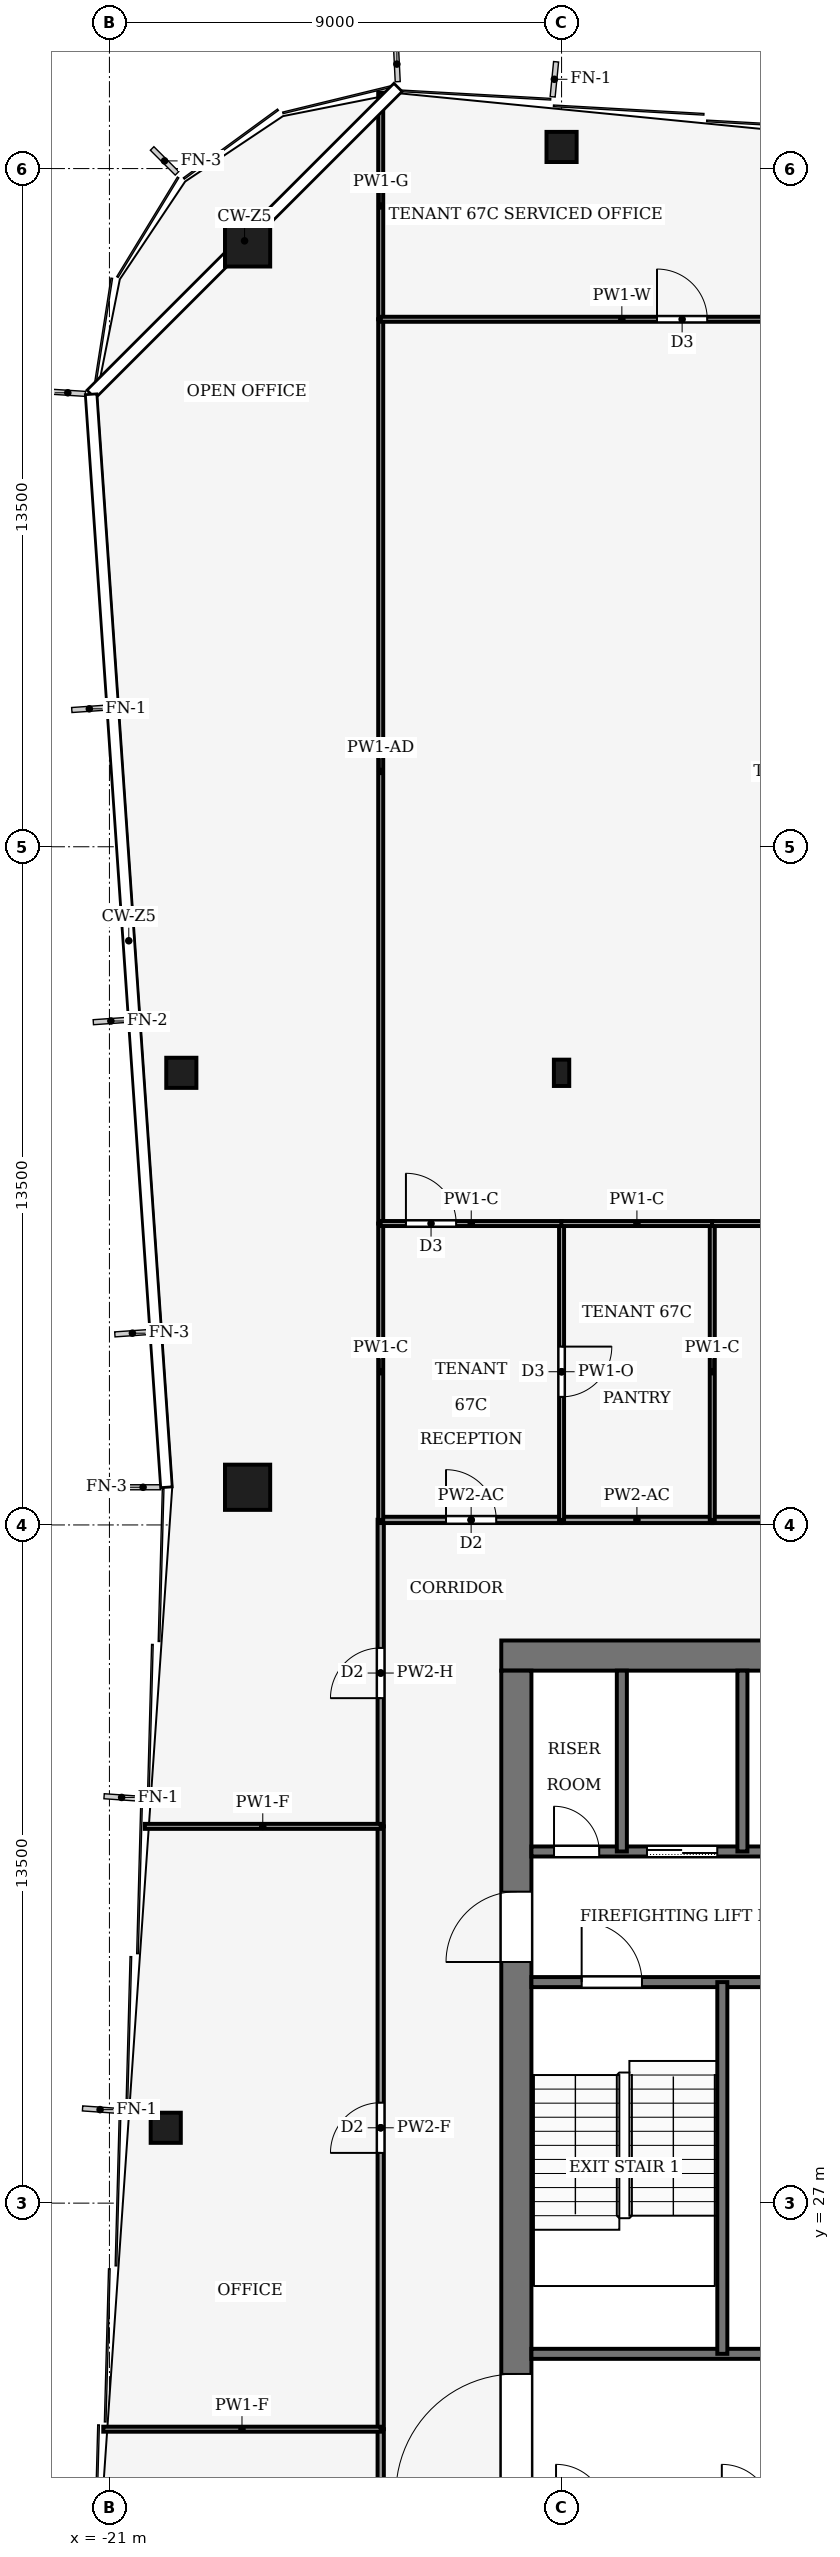
"""IFC4 building model, lengths in metres.
Left out: names, types, materials, properties, quantities, classifications, styles, units other than length and angle.
Written with IfcOpenShell. Run it as: python <this file> out.ifc"""

import sys

from ifc_helpers import new_model, si_unit, direction, frame, frame_2d, origin, origin_2d, place, context, subcontext, project, spatial, rectangle, hollow_rectangle, i_section, extrude, element, fill, save


model = new_model("IFC4")
c1 = context("Model", 3, precision=1e-05, world=origin(), true_north=direction((0.0, 1.0)))
c2 = subcontext(c1, "Body", "Model", "MODEL_VIEW")
j1 = project(units=[si_unit("LENGTHUNIT", "METRE"), si_unit("PLANEANGLEUNIT", "RADIAN")], contexts=[c1])
p1 = place(None, origin())
s1 = spatial("IfcSite", under=j1, at=p1, CompositionType="ELEMENT")
p2 = place(p1, origin())
s2 = spatial("IfcBuilding", under=s1, at=p2, CompositionType="ELEMENT")
p3 = place(p2, frame((0.0, 0.0, 294.0)))
s3 = spatial("IfcBuildingStorey", under=s2, at=p3, CompositionType="ELEMENT", Elevation=294.0)
p4 = place(p3, frame((-13.2, 37.9, -0.13), z_axis=(0.0, 0.0, 1.0), x_axis=(1.0, 0.0, 0.0)))
e1 = element("IfcWall", 1, at=p4, inside=s3, PredefinedType="SHEAR", context=c2, shape_type="SweptSolid", body=[
    extrude(rectangle(XDim=26.4, YDim=0.6, at=frame_2d((13.2, 0.0))), origin(), (0.0, 0.0, 1.0), 4.0),
])
p5 = place(p3, frame((-12.9, 18.4, -0.13), z_axis=(0.0, 0.0, 1.0), x_axis=(0.0, 1.0, 0.0)))
e2 = element("IfcWall", 2, at=p5, inside=s3, PredefinedType="SHEAR", context=c2, shape_type="SweptSolid", body=[
    extrude(rectangle(XDim=19.2, YDim=0.6, at=frame_2d((9.6, 0.0))), origin(), (0.0, 0.0, 1.0), 4.0),
])
p6 = place(p5, frame((2.8, 0.0, 0.13)))
e3 = element("IfcOpeningElement", 3, at=p6, cuts=e2, PredefinedType="OPENING", context=c2, shape_type="SweptSolid", body=[
    extrude(rectangle(XDim=2.4, YDim=2.4, at=frame_2d((1.2, 1.2))), frame((0.0, 0.31, 0.0), z_axis=(0.0, -1.0, 0.0), x_axis=(1.0, 0.0, 0.0)), (0.0, 0.0, 1.0), 0.62),
])
p7 = place(p5, frame((13.4, 0.0, 0.13)))
e4 = element("IfcOpeningElement", 4, at=p7, cuts=e2, PredefinedType="OPENING", context=c2, shape_type="SweptSolid", body=[
    extrude(rectangle(XDim=1.4, YDim=2.2, at=frame_2d((0.7, 1.1))), frame((0.0, 0.31, 0.0), z_axis=(0.0, -1.0, 0.0), x_axis=(1.0, 0.0, 0.0)), (0.0, 0.0, 1.0), 0.62),
])
for number, where, z_axis, x_axis in (
    (5, (-18.25, 66.0, 0.0), (0.0, 0.0, 1.0), (1.0, 0.0, 0.0)),
    (6, (-18.25, 41.25, 0.0), (0.0, 0.0, 1.0), (1.0, 0.0, 0.0)),
):
    element("IfcColumn", number, at=place(p3, frame(where, z_axis=z_axis, x_axis=x_axis)), inside=s3, PredefinedType="COLUMN", context=c2, shape_type="SweptSolid", body=[
        extrude(hollow_rectangle(XDim=0.9, YDim=0.9, WallThickness=0.04, at=origin_2d()), origin(), (0.0, 0.0, 1.0), 4.0),
    ])
for number, where, z_axis, x_axis in (
    (7, (-12.0, 67.93, 0.0), (0.0, 0.0, 1.0), (1.0, 0.0, 0.0)),
    (8, (-19.879, 28.5, 0.0), (0.0, 0.0, 1.0), (1.0, 0.0, 0.0)),
    (9, (-19.569, 49.5, 0.0), (0.0, 0.0, 1.0), (1.0, 0.0, 0.0)),
):
    element("IfcColumn", number, at=place(p3, frame(where, z_axis=z_axis, x_axis=x_axis)), inside=s3, PredefinedType="COLUMN", context=c2, shape_type="SweptSolid", body=[
        extrude(hollow_rectangle(XDim=0.6, YDim=0.6, WallThickness=0.025, at=origin_2d()), origin(), (0.0, 0.0, 1.0), 4.0),
    ])
p8 = place(p3, frame((-12.0, 49.5, 0.0), z_axis=(0.0, 0.0, 1.0), x_axis=(1.0, 0.0, 0.0)))
e10 = element("IfcColumn", 10, at=p8, inside=s3, PredefinedType="COLUMN", context=c2, shape_type="SweptSolid", body=[
    extrude(i_section(OverallWidth=0.306, OverallDepth=0.524, WebThickness=0.012, FlangeThickness=0.04, FilletRadius=0.027, at=origin_2d()), origin(), (0.0, 0.0, 1.0), 4.0),
])
p9 = place(p3, frame((-12.6, 24.0, 0.0), z_axis=(0.0, 0.0, 1.0), x_axis=(1.0, 0.0, 0.0)))
e11 = element("IfcWall", 11, at=p9, inside=s3, PredefinedType="PARTITIONING", context=c2, shape_type="SweptSolid", body=[
    extrude(rectangle(XDim=6.6, YDim=0.2, at=frame_2d((3.3, 0.0))), origin(), (0.0, 0.0, 1.0), 3.87),
])
p10 = place(p9, frame((4.7, 0.0, 0.0)))
e12 = element("IfcOpeningElement", 12, at=p10, cuts=e11, PredefinedType="OPENING", context=c2, shape_type="SweptSolid", body=[
    extrude(rectangle(XDim=1.0, YDim=2.1, at=frame_2d((0.5, 1.05))), frame((0.0, 0.11, 0.0), z_axis=(0.0, -1.0, 0.0), x_axis=(1.0, 0.0, 0.0)), (0.0, 0.0, 1.0), 0.22),
])
p11 = place(p3, frame((-12.6, 31.4, 0.0), z_axis=(0.0, 0.0, 1.0), x_axis=(1.0, 0.0, 0.0)))
e13 = element("IfcWall", 13, at=p11, inside=s3, PredefinedType="PARTITIONING", context=c2, shape_type="SweptSolid", body=[
    extrude(rectangle(XDim=6.6, YDim=0.2, at=frame_2d((3.3, 0.0))), origin(), (0.0, 0.0, 1.0), 3.87),
])
p12 = place(p11, frame((1.0, 0.0, 0.0)))
e14 = element("IfcOpeningElement", 14, at=p12, cuts=e13, PredefinedType="OPENING", context=c2, shape_type="SweptSolid", body=[
    extrude(rectangle(XDim=1.2, YDim=2.2, at=frame_2d((0.6, 1.1))), frame((0.0, 0.11, 0.0), z_axis=(0.0, -1.0, 0.0), x_axis=(1.0, 0.0, 0.0)), (0.0, 0.0, 1.0), 0.22),
])
p13 = place(p3, frame((-12.6, 34.0, 0.0), z_axis=(0.0, 0.0, 1.0), x_axis=(1.0, 0.0, 0.0)))
e15 = element("IfcWall", 15, at=p13, inside=s3, PredefinedType="PARTITIONING", context=c2, shape_type="SweptSolid", body=[
    extrude(rectangle(XDim=6.6, YDim=0.2, at=frame_2d((3.3, 0.0))), origin(), (0.0, 0.0, 1.0), 3.87),
])
p14 = place(p13, frame((4.7, 0.0, 0.0)))
e16 = element("IfcOpeningElement", 16, at=p14, cuts=e15, PredefinedType="OPENING", context=c2, shape_type="SweptSolid", body=[
    extrude(rectangle(XDim=1.4, YDim=2.2, at=frame_2d((0.7, 1.1))), frame((0.0, 0.11, 0.0), z_axis=(0.0, -1.0, 0.0), x_axis=(1.0, 0.0, 0.0)), (0.0, 0.0, 1.0), 0.22),
])
p15 = place(p13, frame((2.3, 0.0, 0.0)))
e17 = element("IfcOpeningElement", 17, at=p15, cuts=e15, PredefinedType="OPENING", context=c2, shape_type="SweptSolid", body=[
    extrude(rectangle(XDim=1.4, YDim=2.2, at=frame_2d((0.7, 1.1))), frame((0.0, 0.11, 0.0), z_axis=(0.0, -1.0, 0.0), x_axis=(1.0, 0.0, 0.0)), (0.0, 0.0, 1.0), 0.22),
])
p16 = place(p13, frame((0.45, 0.0, 0.0)))
e18 = element("IfcOpeningElement", 18, at=p16, cuts=e15, PredefinedType="OPENING", context=c2, shape_type="SweptSolid", body=[
    extrude(rectangle(XDim=0.9, YDim=2.1, at=frame_2d((0.45, 1.05))), frame((0.0, 0.11, 0.0), z_axis=(0.0, -1.0, 0.0), x_axis=(1.0, 0.0, 0.0)), (0.0, 0.0, 1.0), 0.22),
])
p17 = place(p3, frame((-10.8, 34.0, 0.0), z_axis=(0.0, 0.0, 1.0), x_axis=(0.0, 1.0, 0.0)))
e19 = element("IfcWall", 19, at=p17, inside=s3, PredefinedType="PARTITIONING", context=c2, shape_type="SweptSolid", body=[
    extrude(rectangle(XDim=3.6, YDim=0.2, at=frame_2d((1.8, 0.0))), origin(), (0.0, 0.0, 1.0), 3.87),
])
p18 = place(p3, frame((-8.8, 24.0, 0.0), z_axis=(0.0, 0.0, 1.0), x_axis=(0.0, 1.0, 0.0)))
e20 = element("IfcWall", 20, at=p18, inside=s3, PredefinedType="PARTITIONING", context=c2, shape_type="SweptSolid", body=[
    extrude(rectangle(XDim=7.4, YDim=0.2, at=frame_2d((3.7, 0.0))), origin(), (0.0, 0.0, 1.0), 3.87),
])
p19 = place(p3, frame((-8.4, 34.0, 0.0), z_axis=(0.0, 0.0, 1.0), x_axis=(0.0, 1.0, 0.0)))
e21 = element("IfcWall", 21, at=p19, inside=s3, PredefinedType="PARTITIONING", context=c2, shape_type="SweptSolid", body=[
    extrude(rectangle(XDim=3.6, YDim=0.2, at=frame_2d((1.8, 0.0))), origin(), (0.0, 0.0, 1.0), 3.87),
])
p20 = place(p3, frame((-15.6, 13.49, 0.0), z_axis=(0.0, 0.0, 1.0), x_axis=(0.0, 1.0, 0.0)))
e22 = element("IfcWall", 22, at=p20, inside=s3, PredefinedType="PARTITIONING", context=c2, shape_type="SweptSolid", body=[
    extrude(rectangle(XDim=9.01, YDim=0.125, at=frame_2d((4.505, 0.0))), origin(), (0.0, 0.0, 1.0), 2.93),
])
p21 = place(p20, frame((5.271, 0.0, 0.0)))
e23 = element("IfcOpeningElement", 23, at=p21, cuts=e22, PredefinedType="OPENING", context=c2, shape_type="SweptSolid", body=[
    extrude(rectangle(XDim=1.0, YDim=2.1, at=frame_2d((0.5, 1.05))), frame((0.0, 0.073, 0.0), z_axis=(0.0, -1.0, 0.0), x_axis=(1.0, 0.0, 0.0)), (0.0, 0.0, 1.0), 0.145),
])
p22 = place(p3, frame((-15.6, 22.5, 0.0), z_axis=(0.0, 0.0, 1.0), x_axis=(0.0, 1.0, 0.0)))
e24 = element("IfcWall", 24, at=p22, inside=s3, PredefinedType="PARTITIONING", context=c2, shape_type="SweptSolid", body=[
    extrude(rectangle(XDim=12.0, YDim=0.125, at=frame_2d((6.0, 0.0))), origin(), (0.0, 0.0, 1.0), 3.54),
])
p23 = place(p22, frame((5.5, 0.0, 0.0)))
e25 = element("IfcOpeningElement", 25, at=p23, cuts=e24, PredefinedType="OPENING", context=c2, shape_type="SweptSolid", body=[
    extrude(rectangle(XDim=1.0, YDim=2.1, at=frame_2d((0.5, 1.05))), frame((0.0, 0.073, 0.0), z_axis=(0.0, -1.0, 0.0), x_axis=(1.0, 0.0, 0.0)), (0.0, 0.0, 1.0), 0.145),
])
p24 = place(p3, frame((-15.6, 34.5, 0.0), z_axis=(0.0, 0.0, 1.0), x_axis=(0.0, 1.0, 0.0)))
e26 = element("IfcWall", 26, at=p24, inside=s3, PredefinedType="PARTITIONING", context=c2, shape_type="SweptSolid", body=[
    extrude(rectangle(XDim=6.104, YDim=0.125, at=frame_2d((3.052, 0.0))), origin(), (0.0, 0.0, 1.0), 3.14),
])
p25 = place(p24, frame((2.552, 0.0, 0.0)))
e27 = element("IfcOpeningElement", 27, at=p25, cuts=e26, PredefinedType="OPENING", context=c2, shape_type="SweptSolid", body=[
    extrude(rectangle(XDim=1.0, YDim=2.1, at=frame_2d((0.5, 1.05))), frame((0.0, 0.073, 0.0), z_axis=(0.0, -1.0, 0.0), x_axis=(1.0, 0.0, 0.0)), (0.0, 0.0, 1.0), 0.145),
])
p26 = place(p3, frame((-15.6, 40.6, 0.0), z_axis=(0.0, 0.0, 1.0), x_axis=(1.0, 0.0, 0.0)))
e28 = element("IfcWall", 28, at=p26, inside=s3, PredefinedType="PARTITIONING", context=c2, shape_type="SweptSolid", body=[
    extrude(rectangle(XDim=3.6, YDim=0.125, at=frame_2d((1.8, 0.0))), origin(), (0.0, 0.0, 1.0), 3.39),
])
p27 = place(p26, frame((1.3, 0.0, 0.0)))
e29 = element("IfcOpeningElement", 29, at=p27, cuts=e28, PredefinedType="OPENING", context=c2, shape_type="SweptSolid", body=[
    extrude(rectangle(XDim=1.0, YDim=2.1, at=frame_2d((0.5, 1.05))), frame((0.0, 0.073, 0.0), z_axis=(0.0, -1.0, 0.0), x_axis=(1.0, 0.0, 0.0)), (0.0, 0.0, 1.0), 0.145),
])
p28 = place(p3, frame((-9.0, 40.6, 0.0), z_axis=(0.0, 0.0, 1.0), x_axis=(-1.0, 0.0, 0.0)))
e30 = element("IfcWall", 30, at=p28, inside=s3, PredefinedType="PARTITIONING", context=c2, shape_type="SweptSolid", body=[
    extrude(rectangle(XDim=3.0, YDim=0.125, at=frame_2d((1.5, 0.0))), origin(), (0.0, 0.0, 1.0), 3.39),
])
p29 = place(p3, frame((-9.0, 40.6, 0.0), z_axis=(0.0, 0.0, 1.0), x_axis=(1.0, 0.0, 0.0)))
e31 = element("IfcWall", 31, at=p29, inside=s3, PredefinedType="PARTITIONING", context=c2, shape_type="SweptSolid", body=[
    extrude(rectangle(XDim=12.0, YDim=0.125, at=frame_2d((6.0, 0.0))), origin(), (0.0, 0.0, 1.0), 3.39),
])
p30 = place(p29, frame((5.5, 0.0, 0.0)))
e32 = element("IfcOpeningElement", 32, at=p30, cuts=e31, PredefinedType="OPENING", context=c2, shape_type="SweptSolid", body=[
    extrude(rectangle(XDim=1.0, YDim=2.1, at=frame_2d((0.5, 1.05))), frame((0.0, 0.073, 0.0), z_axis=(0.0, -1.0, 0.0), x_axis=(1.0, 0.0, 0.0)), (0.0, 0.0, 1.0), 0.145),
])
p31 = place(p3, frame((-15.6, 22.5, 0.0), z_axis=(0.0, 0.0, 1.0), x_axis=(-1.0, 0.0, 0.0)))
e33 = element("IfcWall", 33, at=p31, inside=s3, PredefinedType="PARTITIONING", context=c2, shape_type="SweptSolid", body=[
    extrude(rectangle(XDim=5.523, YDim=0.1, at=frame_2d((2.761, 0.0))), origin(), (0.0, 0.0, 1.0), 3.04),
])
p32 = place(p3, frame((-15.6, 34.5, 0.0), z_axis=(0.0, 0.0, 1.0), x_axis=(-1.0, 0.0, 0.0)))
e34 = element("IfcWall", 34, at=p32, inside=s3, PredefinedType="PARTITIONING", context=c2, shape_type="SweptSolid", body=[
    extrude(rectangle(XDim=4.695, YDim=0.1, at=frame_2d((2.348, 0.0))), origin(), (0.0, 0.0, 1.0), 3.04),
])
p33 = place(p3, frame((-15.6, 40.6, 0.0), z_axis=(0.0, 0.0, 1.0), x_axis=(0.0, 1.0, 0.0)))
e35 = element("IfcWall", 35, at=p33, inside=s3, PredefinedType="PARTITIONING", context=c2, shape_type="SweptSolid", body=[
    extrude(rectangle(XDim=5.9, YDim=0.1, at=frame_2d((2.95, 0.0))), origin(), (0.0, 0.0, 1.0), 3.87),
])
p34 = place(p3, frame((-15.6, 46.5, 0.0), z_axis=(0.0, 0.0, 1.0), x_axis=(0.0, 1.0, 0.0)))
e36 = element("IfcWall", 36, at=p34, inside=s3, PredefinedType="PARTITIONING", context=c2, shape_type="SweptSolid", body=[
    extrude(rectangle(XDim=18.0, YDim=0.1, at=frame_2d((9.0, 0.0))), origin(), (0.0, 0.0, 1.0), 3.35),
])
p35 = place(p3, frame((-15.6, 64.5, 0.0), z_axis=(0.0, 0.0, 1.0), x_axis=(0.0, 1.0, 0.0)))
e37 = element("IfcWall", 37, at=p35, inside=s3, PredefinedType="PARTITIONING", context=c2, shape_type="SweptSolid", body=[
    extrude(rectangle(XDim=4.51, YDim=0.1, at=frame_2d((2.255, 0.0))), origin(), (0.0, 0.0, 1.0), 2.93),
])
p36 = place(p3, frame((-12.0, 46.5, 0.0), z_axis=(0.0, 0.0, 1.0), x_axis=(0.0, -1.0, 0.0)))
e38 = element("IfcWall", 38, at=p36, inside=s3, PredefinedType="PARTITIONING", context=c2, shape_type="SweptSolid", body=[
    extrude(rectangle(XDim=5.9, YDim=0.1, at=frame_2d((2.95, 0.0))), origin(), (0.0, 0.0, 1.0), 3.39),
])
p37 = place(p36, frame((2.45, 0.0, 0.0)))
e39 = element("IfcOpeningElement", 39, at=p37, cuts=e38, PredefinedType="OPENING", context=c2, shape_type="SweptSolid", body=[
    extrude(rectangle(XDim=1.0, YDim=2.1, at=frame_2d((0.5, 1.05))), frame((0.0, 0.06, 0.0), z_axis=(0.0, -1.0, 0.0), x_axis=(1.0, 0.0, 0.0)), (0.0, 0.0, 1.0), 0.12),
])
p38 = place(p3, frame((-15.6, 46.5, 0.0), z_axis=(0.0, 0.0, 1.0), x_axis=(1.0, 0.0, 0.0)))
e40 = element("IfcWall", 40, at=p38, inside=s3, PredefinedType="PARTITIONING", context=c2, shape_type="SweptSolid", body=[
    extrude(rectangle(XDim=3.604, YDim=0.1, at=frame_2d((1.802, 0.0))), origin(), (0.0, 0.0, 1.0), 3.87),
])
p39 = place(p38, frame((0.502, 0.0, 0.0)))
e41 = element("IfcOpeningElement", 41, at=p39, cuts=e40, PredefinedType="OPENING", context=c2, shape_type="SweptSolid", body=[
    extrude(rectangle(XDim=1.0, YDim=2.1, at=frame_2d((0.5, 1.05))), frame((0.0, 0.06, 0.0), z_axis=(0.0, -1.0, 0.0), x_axis=(1.0, 0.0, 0.0)), (0.0, 0.0, 1.0), 0.12),
])
p40 = place(p3, frame((-9.0, 40.6, 0.0), z_axis=(0.0, 0.0, 1.0), x_axis=(0.0, 1.0, 0.0)))
e42 = element("IfcWall", 42, at=p40, inside=s3, PredefinedType="PARTITIONING", context=c2, shape_type="SweptSolid", body=[
    extrude(rectangle(XDim=5.9, YDim=0.1, at=frame_2d((2.95, 0.0))), origin(), (0.0, 0.0, 1.0), 3.87),
])
p41 = place(p3, frame((-8.996, 46.5, 0.0), z_axis=(0.0, 0.0, 1.0), x_axis=(-1.0, 0.0, 0.0)))
e43 = element("IfcWall", 43, at=p41, inside=s3, PredefinedType="PARTITIONING", context=c2, shape_type="SweptSolid", body=[
    extrude(rectangle(XDim=3.008, YDim=0.1, at=frame_2d((1.504, 0.0))), origin(), (0.0, 0.0, 1.0), 3.87),
])
p42 = place(p3, frame((3.0, 46.5, 0.0), z_axis=(0.0, 0.0, 1.0), x_axis=(-1.0, 0.0, 0.0)))
e44 = element("IfcWall", 44, at=p42, inside=s3, PredefinedType="PARTITIONING", context=c2, shape_type="SweptSolid", body=[
    extrude(rectangle(XDim=12.004, YDim=0.1, at=frame_2d((6.002, 0.0))), origin(), (0.0, 0.0, 1.0), 3.39),
])
p43 = place(p3, frame((-15.6, 64.5, 0.0), z_axis=(0.0, 0.0, 1.0), x_axis=(1.0, 0.0, 0.0)))
e45 = element("IfcWall", 45, at=p43, inside=s3, PredefinedType="PARTITIONING", context=c2, shape_type="SweptSolid", body=[
    extrude(rectangle(XDim=9.6, YDim=0.1, at=frame_2d((4.8, 0.0))), origin(), (0.0, 0.0, 1.0), 3.24),
])
p44 = place(p43, frame((5.5, 0.0, 0.0)))
e46 = element("IfcOpeningElement", 46, at=p44, cuts=e45, PredefinedType="OPENING", context=c2, shape_type="SweptSolid", body=[
    extrude(rectangle(XDim=1.0, YDim=2.1, at=frame_2d((0.5, 1.05))), frame((0.0, 0.06, 0.0), z_axis=(0.0, -1.0, 0.0), x_axis=(1.0, 0.0, 0.0)), (0.0, 0.0, 1.0), 0.12),
])
p45 = place(p15, origin())
e47 = element("IfcDoor", 47, at=p45, inside=s3, OperationType="SLIDING_TO_LEFT", PredefinedType="DOOR", context=c2, shape_type="SweptSolid", body=[
    extrude(rectangle(XDim=1.4, YDim=2.2, at=frame_2d((0.7, 1.1))), frame((0.0, 0.025, 0.0), z_axis=(0.0, -1.0, 0.0), x_axis=(1.0, 0.0, 0.0)), (0.0, 0.0, 1.0), 0.05),
])
fill(e17, e47)
p46 = place(p16, origin())
e48 = element("IfcDoor", 48, at=p46, inside=s3, OperationType="SINGLE_SWING_RIGHT", PredefinedType="DOOR", context=c2, shape_type="SweptSolid", body=[
    extrude(rectangle(XDim=0.9, YDim=2.1, at=frame_2d((0.45, 1.05))), frame((0.0, 0.025, 0.0), z_axis=(0.0, -1.0, 0.0), x_axis=(1.0, 0.0, 0.0)), (0.0, 0.0, 1.0), 0.05),
])
fill(e18, e48)
p47 = place(p12, origin())
e49 = element("IfcDoor", 49, at=p47, inside=s3, OperationType="SINGLE_SWING_LEFT", PredefinedType="DOOR", context=c2, shape_type="SweptSolid", body=[
    extrude(rectangle(XDim=1.2, YDim=2.2, at=frame_2d((0.6, 1.1))), frame((0.0, 0.025, 0.0), z_axis=(0.0, -1.0, 0.0), x_axis=(1.0, 0.0, 0.0)), (0.0, 0.0, 1.0), 0.05),
])
fill(e14, e49)
p48 = place(p6, origin())
e50 = element("IfcDoor", 50, at=p48, inside=s3, OperationType="DOUBLE_DOOR_SINGLE_SWING", PredefinedType="DOOR", context=c2, shape_type="SweptSolid", body=[
    extrude(rectangle(XDim=2.4, YDim=2.4, at=frame_2d((1.2, 1.2))), frame((0.0, 0.025, 0.0), z_axis=(0.0, -1.0, 0.0), x_axis=(1.0, 0.0, 0.0)), (0.0, 0.0, 1.0), 0.05),
])
fill(e3, e50)
p49 = place(p7, origin())
e51 = element("IfcDoor", 51, at=p49, inside=s3, OperationType="SINGLE_SWING_LEFT", PredefinedType="DOOR", context=c2, shape_type="SweptSolid", body=[
    extrude(rectangle(XDim=1.4, YDim=2.2, at=frame_2d((0.7, 1.1))), frame((0.0, 0.025, 0.0), z_axis=(0.0, -1.0, 0.0), x_axis=(1.0, 0.0, 0.0)), (0.0, 0.0, 1.0), 0.05),
])
fill(e4, e51)
p50 = place(p23, origin())
e52 = element("IfcDoor", 52, at=p50, inside=s3, OperationType="SINGLE_SWING_RIGHT", PredefinedType="DOOR", context=c2, shape_type="SweptSolid", body=[
    extrude(rectangle(XDim=1.0, YDim=2.1, at=frame_2d((0.5, 1.05))), frame((0.0, 0.025, 0.0), z_axis=(0.0, -1.0, 0.0), x_axis=(1.0, 0.0, 0.0)), (0.0, 0.0, 1.0), 0.05),
])
fill(e25, e52)
p51 = place(p25, origin())
e53 = element("IfcDoor", 53, at=p51, inside=s3, OperationType="SINGLE_SWING_LEFT", PredefinedType="DOOR", context=c2, shape_type="SweptSolid", body=[
    extrude(rectangle(XDim=1.0, YDim=2.1, at=frame_2d((0.5, 1.05))), frame((0.0, 0.025, 0.0), z_axis=(0.0, -1.0, 0.0), x_axis=(1.0, 0.0, 0.0)), (0.0, 0.0, 1.0), 0.05),
])
fill(e27, e53)
p52 = place(p27, origin())
e54 = element("IfcDoor", 54, at=p52, inside=s3, OperationType="SINGLE_SWING_LEFT", PredefinedType="DOOR", context=c2, shape_type="SweptSolid", body=[
    extrude(rectangle(XDim=1.0, YDim=2.1, at=frame_2d((0.5, 1.05))), frame((0.0, 0.025, 0.0), z_axis=(0.0, -1.0, 0.0), x_axis=(1.0, 0.0, 0.0)), (0.0, 0.0, 1.0), 0.05),
])
fill(e29, e54)
p53 = place(p37, origin())
e55 = element("IfcDoor", 55, at=p53, inside=s3, OperationType="SINGLE_SWING_LEFT", PredefinedType="DOOR", context=c2, shape_type="SweptSolid", body=[
    extrude(rectangle(XDim=1.0, YDim=2.1, at=frame_2d((0.5, 1.05))), frame((0.0, 0.025, 0.0), z_axis=(0.0, -1.0, 0.0), x_axis=(1.0, 0.0, 0.0)), (0.0, 0.0, 1.0), 0.05),
])
fill(e39, e55)
p54 = place(p39, origin())
e56 = element("IfcDoor", 56, at=p54, inside=s3, OperationType="SINGLE_SWING_LEFT", PredefinedType="DOOR", context=c2, shape_type="SweptSolid", body=[
    extrude(rectangle(XDim=1.0, YDim=2.1, at=frame_2d((0.5, 1.05))), frame((0.0, 0.025, 0.0), z_axis=(0.0, -1.0, 0.0), x_axis=(1.0, 0.0, 0.0)), (0.0, 0.0, 1.0), 0.05),
])
fill(e41, e56)
p55 = place(p44, origin())
e57 = element("IfcDoor", 57, at=p55, inside=s3, OperationType="SINGLE_SWING_RIGHT", PredefinedType="DOOR", context=c2, shape_type="SweptSolid", body=[
    extrude(rectangle(XDim=1.0, YDim=2.1, at=frame_2d((0.5, 1.05))), frame((0.0, 0.025, 0.0), z_axis=(0.0, -1.0, 0.0), x_axis=(1.0, 0.0, 0.0)), (0.0, 0.0, 1.0), 0.05),
])
fill(e46, e57)
save(model, sys.argv[1])
